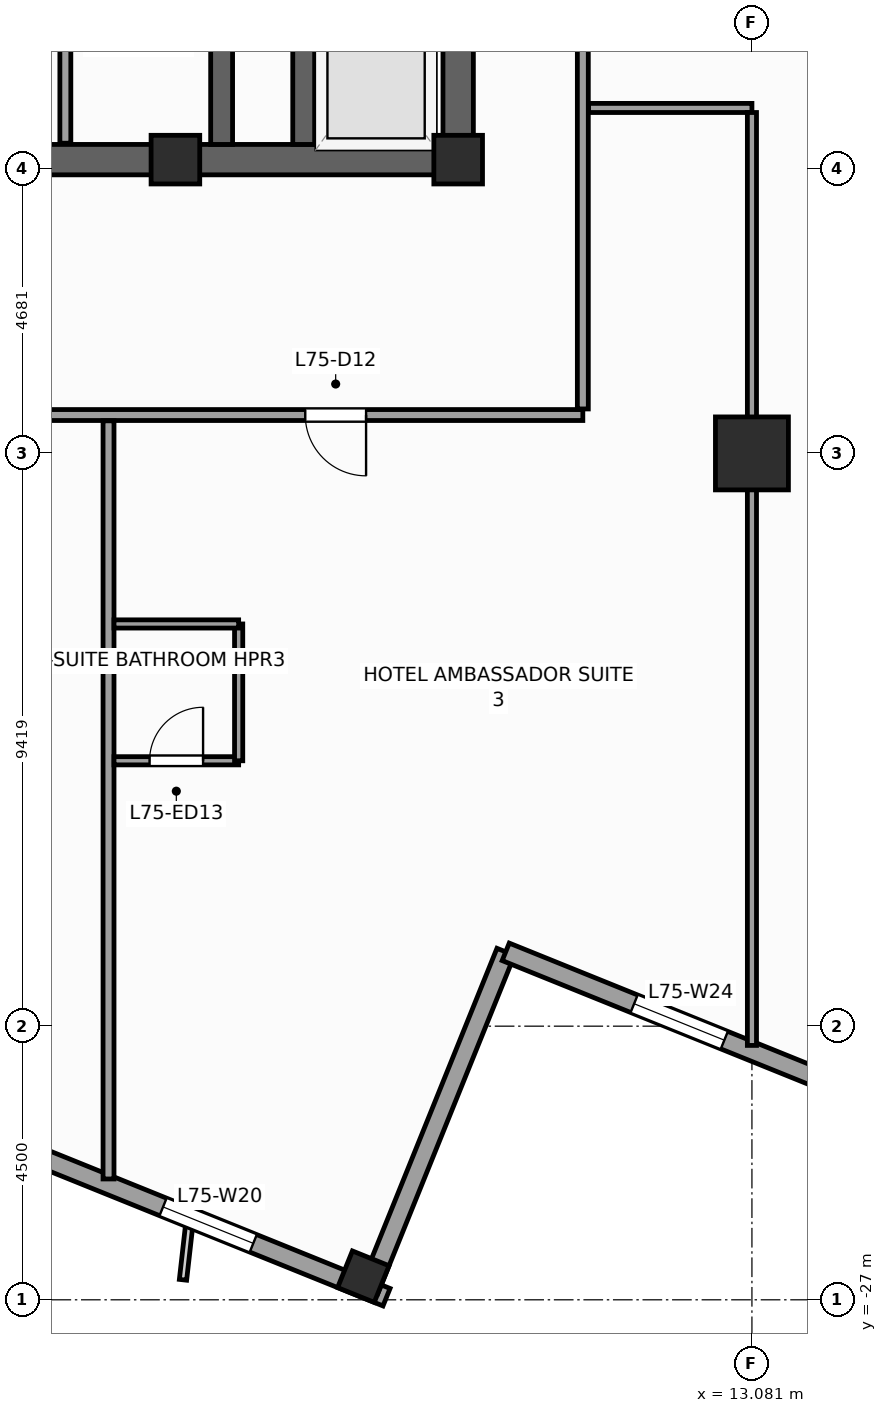
"""IFC4 building model, lengths in metres.
Left out: names, types, materials, properties, quantities, classifications, styles, units other than length and angle.
Written with IfcOpenShell. Run it as: python <this file> out.ifc"""

import sys

from ifc_helpers import new_model, si_unit, direction, frame, frame_2d, origin, origin_2d, place, context, subcontext, project, spatial, rectangle, extrude, source, transform, mapped, element, fill, save


model = new_model("IFC4")
c1 = context("Model", 3, precision=1e-05, world=origin(), true_north=direction((0.0, 1.0)))
c2 = subcontext(c1, "Body", "Model", "MODEL_VIEW")
j1 = project(units=[si_unit("LENGTHUNIT", "METRE"), si_unit("PLANEANGLEUNIT", "RADIAN")], contexts=[c1])
p1 = place(None, origin())
s1 = spatial("IfcSite", under=j1, at=p1, CompositionType="ELEMENT")
p2 = place(p1, origin())
s2 = spatial("IfcBuilding", under=s1, at=p2, CompositionType="ELEMENT")
p3 = place(p2, frame((0.0, 0.0, 304.8)))
s3 = spatial("IfcBuildingStorey", under=s2, at=p3, CompositionType="ELEMENT", Elevation=304.8)
p4 = place(p3, frame((-8.5, -8.25, 0.0), z_axis=(0.0, 0.0, 1.0), x_axis=(1.0, 0.0, 0.0)))
e1 = element("IfcWall", 1, at=p4, inside=s3, PredefinedType="SHEAR", context=c2, shape_type="SweptSolid", body=[
    extrude(rectangle(XDim=17.0, YDim=0.5, at=frame_2d((8.5, 0.0))), origin(), (0.0, 0.0, 1.0), 3.6),
])
p5 = place(p4, frame((7.85, 0.0, 0.0)))
e2 = element("IfcOpeningElement", 2, at=p5, cuts=e1, PredefinedType="OPENING", context=c2, shape_type="SweptSolid", body=[
    extrude(rectangle(XDim=1.3, YDim=2.2, at=frame_2d((0.65, 1.1))), frame((0.0, 0.26, 0.0), z_axis=(0.0, -1.0, 0.0), x_axis=(1.0, 0.0, 0.0)), (0.0, 0.0, 1.0), 0.52),
])
p6 = place(p3, frame((8.25, -8.0, 0.0), z_axis=(0.0, 0.0, 1.0), x_axis=(0.0, 1.0, 0.0)))
e3 = element("IfcWall", 3, at=p6, inside=s3, PredefinedType="SHEAR", context=c2, shape_type="SweptSolid", body=[
    extrude(rectangle(XDim=16.0, YDim=0.5, at=frame_2d((8.0, 0.0))), origin(), (0.0, 0.0, 1.0), 3.6),
])
p7 = place(p6, frame((4.69, 0.0, 0.0)))
e4 = element("IfcOpeningElement", 4, at=p7, cuts=e3, PredefinedType="OPENING", context=c2, shape_type="SweptSolid", body=[
    extrude(rectangle(XDim=1.3, YDim=2.2, at=frame_2d((0.65, 1.1))), frame((0.0, 0.26, 0.0), z_axis=(0.0, -1.0, 0.0), x_axis=(1.0, 0.0, 0.0)), (0.0, 0.0, 1.0), 0.52),
])
p8 = place(p3, frame((4.36, -8.0, 0.0), z_axis=(0.0, 0.0, 1.0), x_axis=(0.0, 1.0, 0.0)))
e5 = element("IfcWall", 5, at=p8, inside=s3, PredefinedType="SHEAR", context=c2, shape_type="SweptSolid", body=[
    extrude(rectangle(XDim=16.0, YDim=0.36, at=frame_2d((8.0, 0.0))), origin(), (0.0, 0.0, 1.0), 3.6),
])
p9 = place(p3, frame((5.71, -8.0, 0.0), z_axis=(0.0, 0.0, 1.0), x_axis=(0.0, 1.0, 0.0)))
e6 = element("IfcWall", 6, at=p9, inside=s3, PredefinedType="SHEAR", context=c2, shape_type="SweptSolid", body=[
    extrude(rectangle(XDim=2.54, YDim=0.36, at=frame_2d((1.27, 0.0))), origin(), (0.0, 0.0, 1.0), 3.6),
])
m1 = source(origin(), c2, "Body", "SweptSolid", [
    extrude(rectangle(XDim=0.8, YDim=0.8, at=origin_2d()), origin(), (0.0, 0.0, 1.0), 3.6),
])
for number, where, z_axis, x_axis in (
    (7, (8.25, -8.25, 0.0), (0.0, 0.0, 1.0), (1.0, 0.0, 0.0)),
    (8, (3.6, -8.25, 0.0), (0.0, 0.0, 1.0), (1.0, 0.0, 0.0)),
):
    element("IfcColumn", number, at=place(p3, frame(where, z_axis=z_axis, x_axis=x_axis)), inside=s3, PredefinedType="PILASTER", context=c2, shape_type="MappedRepresentation", body=[
        mapped(m1, transform((0.0, 0.0, 0.0), scale=1.0)),
    ])
m2 = source(origin(), c2, "Body", "SweptSolid", [
    extrude(rectangle(XDim=1.2, YDim=1.2, at=origin_2d()), origin(), (0.0, 0.0, 1.0), 3.6),
])
p10 = place(p3, frame((13.081, -13.081, 0.0), z_axis=(0.0, 0.0, 1.0), x_axis=(1.0, 0.0, 0.0)))
e9 = element("IfcColumn", 9, at=p10, inside=s3, PredefinedType="COLUMN", context=c2, shape_type="MappedRepresentation", body=[
    mapped(m2, transform((0.0, 0.0, 0.0), scale=1.0)),
])
m3 = source(origin(), c2, "Body", "SweptSolid", [
    extrude(rectangle(XDim=0.65, YDim=0.65, at=origin_2d()), origin(), (0.0, 0.0, 1.0), 3.6),
])
p11 = place(p3, frame((6.69, -26.62, 0.0), z_axis=(0.0, 0.0, 1.0), x_axis=(0.374606593416, 0.927183854567, 0.0)))
e10 = element("IfcColumn", 10, at=p11, inside=s3, PredefinedType="COLUMN", context=c2, shape_type="MappedRepresentation", body=[
    mapped(m3, transform((0.0, 0.0, 0.0), scale=1.0)),
])
p12 = place(p3, frame((-23.813, -14.479, 0.0), z_axis=(0.0, 0.0, 1.0), x_axis=(0.927182657188, -0.374609557019, 0.0)))
e11 = element("IfcWall", 11, at=p12, inside=s3, PredefinedType="STANDARD", context=c2, shape_type="SweptSolid", body=[
    extrude(rectangle(XDim=33.31, YDim=0.31, at=frame_2d((16.655, 0.0))), origin(), (0.0, 0.0, 1.0), 2.75),
])
p13 = place(p12, frame((3.197, 0.0, 0.47)))
e12 = element("IfcOpeningElement", 12, at=p13, cuts=e11, PredefinedType="OPENING", context=c2, shape_type="SweptSolid", body=[
    extrude(rectangle(XDim=1.6, YDim=2.1, at=frame_2d((0.8, 1.05))), frame((0.0, 0.165, 0.0), z_axis=(0.0, -1.0, 0.0), x_axis=(1.0, 0.0, 0.0)), (0.0, 0.0, 1.0), 0.33),
])
p14 = place(p12, frame((8.86, 0.0, 0.47)))
e13 = element("IfcOpeningElement", 13, at=p14, cuts=e11, PredefinedType="OPENING", context=c2, shape_type="SweptSolid", body=[
    extrude(rectangle(XDim=1.6, YDim=2.1, at=frame_2d((0.8, 1.05))), frame((0.0, 0.165, 0.0), z_axis=(0.0, -1.0, 0.0), x_axis=(1.0, 0.0, 0.0)), (0.0, 0.0, 1.0), 0.33),
])
p15 = place(p12, frame((14.439, 0.0, 0.47)))
e14 = element("IfcOpeningElement", 14, at=p15, cuts=e11, PredefinedType="OPENING", context=c2, shape_type="SweptSolid", body=[
    extrude(rectangle(XDim=1.6, YDim=2.1, at=frame_2d((0.8, 1.05))), frame((0.0, 0.165, 0.0), z_axis=(0.0, -1.0, 0.0), x_axis=(1.0, 0.0, 0.0)), (0.0, 0.0, 1.0), 0.33),
])
p16 = place(p12, frame((23.351, 0.0, 0.47)))
e15 = element("IfcOpeningElement", 15, at=p16, cuts=e11, PredefinedType="OPENING", context=c2, shape_type="SweptSolid", body=[
    extrude(rectangle(XDim=1.6, YDim=2.1, at=frame_2d((0.8, 1.05))), frame((0.0, 0.165, 0.0), z_axis=(0.0, -1.0, 0.0), x_axis=(1.0, 0.0, 0.0)), (0.0, 0.0, 1.0), 0.33),
])
p17 = place(p12, frame((29.347, 0.0, 0.47)))
e16 = element("IfcOpeningElement", 16, at=p17, cuts=e11, PredefinedType="OPENING", context=c2, shape_type="SweptSolid", body=[
    extrude(rectangle(XDim=1.6, YDim=2.1, at=frame_2d((0.8, 1.05))), frame((0.0, 0.165, 0.0), z_axis=(0.0, -1.0, 0.0), x_axis=(1.0, 0.0, 0.0)), (0.0, 0.0, 1.0), 0.33),
])
p18 = place(p3, frame((6.784, -26.841, 0.0), z_axis=(0.0, 0.0, 1.0), x_axis=(0.374636620962, 0.927171722085, 0.0)))
e17 = element("IfcWall", 17, at=p18, inside=s3, PredefinedType="STANDARD", context=c2, shape_type="SweptSolid", body=[
    extrude(rectangle(XDim=6.0, YDim=0.31, at=frame_2d((3.0, 0.0))), origin(), (0.0, 0.0, 1.0), 2.65),
])
p19 = place(p3, frame((9.032, -21.278, 0.0), z_axis=(0.0, 0.0, 1.0), x_axis=(0.927185411764, -0.374602739196, 0.0)))
e18 = element("IfcWall", 18, at=p19, inside=s3, PredefinedType="STANDARD", context=c2, shape_type="SweptSolid", body=[
    extrude(rectangle(XDim=6.155, YDim=0.31, at=frame_2d((3.078, 0.0))), origin(), (0.0, 0.0, 1.0), 3.35),
])
p20 = place(p19, frame((2.278, 0.0, 0.47)))
e19 = element("IfcOpeningElement", 19, at=p20, cuts=e18, PredefinedType="OPENING", context=c2, shape_type="SweptSolid", body=[
    extrude(rectangle(XDim=1.6, YDim=2.1, at=frame_2d((0.8, 1.05))), frame((0.0, 0.165, 0.0), z_axis=(0.0, -1.0, 0.0), x_axis=(1.0, 0.0, 0.0)), (0.0, 0.0, 1.0), 0.33),
])
p21 = place(p3, frame((1.79, -7.98, 0.0), z_axis=(0.0, 0.0, 1.0), x_axis=(0.0, 1.0, 0.0)))
e20 = element("IfcWall", 20, at=p21, inside=s3, PredefinedType="PARTITIONING", context=c2, shape_type="SweptSolid", body=[
    extrude(rectangle(XDim=12.38, YDim=0.18, at=frame_2d((6.19, 0.0))), origin(), (0.0, 0.0, 1.0), 3.35),
])
p22 = place(p21, frame((8.8, 0.0, 0.0)))
e21 = element("IfcOpeningElement", 21, at=p22, cuts=e20, PredefinedType="OPENING", context=c2, shape_type="SweptSolid", body=[
    extrude(rectangle(XDim=1.1, YDim=2.2, at=frame_2d((0.55, 1.1))), frame((0.0, 0.1, 0.0), z_axis=(0.0, -1.0, 0.0), x_axis=(1.0, 0.0, 0.0)), (0.0, 0.0, 1.0), 0.2),
])
p23 = place(p21, frame((10.86, 0.0, 0.0)))
e22 = element("IfcOpeningElement", 22, at=p23, cuts=e20, PredefinedType="OPENING", context=c2, shape_type="SweptSolid", body=[
    extrude(rectangle(XDim=1.1, YDim=2.2, at=frame_2d((0.55, 1.1))), frame((0.0, 0.1, 0.0), z_axis=(0.0, -1.0, 0.0), x_axis=(1.0, 0.0, 0.0)), (0.0, 0.0, 1.0), 0.2),
])
p24 = place(p21, frame((3.5, 0.0, 0.0)))
e23 = element("IfcOpeningElement", 23, at=p24, cuts=e20, PredefinedType="OPENING", context=c2, shape_type="SweptSolid", body=[
    extrude(rectangle(XDim=1.15, YDim=2.25, at=frame_2d((0.575, 1.125))), frame((0.0, 0.1, 0.0), z_axis=(0.0, -1.0, 0.0), x_axis=(1.0, 0.0, 0.0)), (0.0, 0.0, 1.0), 0.2),
])
p25 = place(p3, frame((-10.3, -12.45, 0.0), z_axis=(0.0, 0.0, 1.0), x_axis=(1.0, 0.0, 0.0)))
e24 = element("IfcWall", 24, at=p25, inside=s3, PredefinedType="PARTITIONING", context=c2, shape_type="SweptSolid", body=[
    extrude(rectangle(XDim=20.6, YDim=0.18, at=frame_2d((10.3, 0.0))), origin(), (0.0, 0.0, 1.0), 3.35),
])
p26 = place(p25, frame((1.605, 0.0, 0.0)))
e25 = element("IfcOpeningElement", 25, at=p26, cuts=e24, PredefinedType="OPENING", context=c2, shape_type="SweptSolid", body=[
    extrude(rectangle(XDim=0.95, YDim=2.1, at=frame_2d((0.475, 1.05))), frame((0.0, 0.1, 0.0), z_axis=(0.0, -1.0, 0.0), x_axis=(1.0, 0.0, 0.0)), (0.0, 0.0, 1.0), 0.2),
])
p27 = place(p25, frame((16.036, 0.0, 0.0)))
e26 = element("IfcOpeningElement", 26, at=p27, cuts=e24, PredefinedType="OPENING", context=c2, shape_type="SweptSolid", body=[
    extrude(rectangle(XDim=1.0, YDim=2.15, at=frame_2d((0.5, 1.075))), frame((0.0, 0.1, 0.0), z_axis=(0.0, -1.0, 0.0), x_axis=(1.0, 0.0, 0.0)), (0.0, 0.0, 1.0), 0.2),
])
p28 = place(p25, frame((9.55, 0.0, 0.0)))
e27 = element("IfcOpeningElement", 27, at=p28, cuts=e24, PredefinedType="OPENING", context=c2, shape_type="SweptSolid", body=[
    extrude(rectangle(XDim=1.0, YDim=2.15, at=frame_2d((0.5, 1.075))), frame((0.0, 0.1, 0.0), z_axis=(0.0, -1.0, 0.0), x_axis=(1.0, 0.0, 0.0)), (0.0, 0.0, 1.0), 0.2),
])
p29 = place(p3, frame((10.3, -12.35, 0.0), z_axis=(0.0, 0.0, 1.0), x_axis=(0.0, 1.0, 0.0)))
e28 = element("IfcWall", 28, at=p29, inside=s3, PredefinedType="PARTITIONING", context=c2, shape_type="SweptSolid", body=[
    extrude(rectangle(XDim=24.7, YDim=0.18, at=frame_2d((12.35, 0.0))), origin(), (0.0, 0.0, 1.0), 3.35),
])
p30 = place(p29, frame((21.561, 0.0, 0.0)))
e29 = element("IfcOpeningElement", 29, at=p30, cuts=e28, PredefinedType="OPENING", context=c2, shape_type="SweptSolid", body=[
    extrude(rectangle(XDim=1.0, YDim=2.15, at=frame_2d((0.5, 1.075))), frame((0.0, 0.1, 0.0), z_axis=(0.0, -1.0, 0.0), x_axis=(1.0, 0.0, 0.0)), (0.0, 0.0, 1.0), 0.2),
])
p31 = place(p29, frame((16.8, 0.0, 0.0)))
e30 = element("IfcOpeningElement", 30, at=p31, cuts=e28, PredefinedType="OPENING", context=c2, shape_type="SweptSolid", body=[
    extrude(rectangle(XDim=1.0, YDim=2.15, at=frame_2d((0.5, 1.075))), frame((0.0, 0.1, 0.0), z_axis=(0.0, -1.0, 0.0), x_axis=(1.0, 0.0, 0.0)), (0.0, 0.0, 1.0), 0.2),
])
p32 = place(p29, frame((11.85, 0.0, 0.0)))
e31 = element("IfcOpeningElement", 31, at=p32, cuts=e28, PredefinedType="OPENING", context=c2, shape_type="SweptSolid", body=[
    extrude(rectangle(XDim=1.0, YDim=2.15, at=frame_2d((0.5, 1.075))), frame((0.0, 0.1, 0.0), z_axis=(0.0, -1.0, 0.0), x_axis=(1.0, 0.0, 0.0)), (0.0, 0.0, 1.0), 0.2),
])
p33 = place(p29, frame((6.9, 0.0, 0.0)))
e32 = element("IfcOpeningElement", 32, at=p33, cuts=e28, PredefinedType="OPENING", context=c2, shape_type="SweptSolid", body=[
    extrude(rectangle(XDim=1.0, YDim=2.15, at=frame_2d((0.5, 1.075))), frame((0.0, 0.1, 0.0), z_axis=(0.0, -1.0, 0.0), x_axis=(1.0, 0.0, 0.0)), (0.0, 0.0, 1.0), 0.2),
])
p34 = place(p3, frame((2.5, -12.545, 0.0), z_axis=(0.0, 0.0, 1.0), x_axis=(0.0, -1.0, 0.0)))
e33 = element("IfcWall", 33, at=p34, inside=s3, PredefinedType="PARTITIONING", context=c2, shape_type="SweptSolid", body=[
    extrude(rectangle(XDim=12.468, YDim=0.18, at=frame_2d((6.234, 0.0))), origin(), (0.0, 0.0, 1.0), 3.02),
])
p35 = place(p3, frame((10.395, -7.4, 0.0), z_axis=(0.0, 0.0, 1.0), x_axis=(1.0, 0.0, 0.0)))
e34 = element("IfcWall", 34, at=p35, inside=s3, PredefinedType="PARTITIONING", context=c2, shape_type="SweptSolid", body=[
    extrude(rectangle(XDim=2.686, YDim=0.15, at=frame_2d((1.343, 0.0))), origin(), (0.0, 0.0, 1.0), 3.35),
])
p36 = place(p3, frame((13.081, -7.475, 0.0), z_axis=(0.0, 0.0, 1.0), x_axis=(0.0, -1.0, 0.0)))
e35 = element("IfcWall", 35, at=p36, inside=s3, PredefinedType="PARTITIONING", context=c2, shape_type="SweptSolid", body=[
    extrude(rectangle(XDim=15.342, YDim=0.15, at=frame_2d((7.671, 0.0))), origin(), (0.0, 0.0, 1.0), 2.45),
])
p37 = place(p3, frame((2.59, -18.136, 0.0), z_axis=(0.0, 0.0, 1.0), x_axis=(1.0, 0.0, 0.0)))
e36 = element("IfcWall", 36, at=p37, inside=s3, PredefinedType="PARTITIONING", context=c2, shape_type="SweptSolid", body=[
    extrude(rectangle(XDim=2.05, YDim=0.135, at=frame_2d((1.025, 0.0))), origin(), (0.0, 0.0, 1.0), 3.35),
])
p38 = place(p37, frame((0.585, 0.0, 0.0)))
e37 = element("IfcOpeningElement", 37, at=p38, cuts=e36, PredefinedType="OPENING", context=c2, shape_type="SweptSolid", body=[
    extrude(rectangle(XDim=0.88, YDim=2.1, at=frame_2d((0.44, 1.05))), frame((0.0, 0.078, 0.0), z_axis=(0.0, -1.0, 0.0), x_axis=(1.0, 0.0, 0.0)), (0.0, 0.0, 1.0), 0.155),
])
p39 = place(p3, frame((4.64, -18.136, 0.0), z_axis=(0.0, 0.0, 1.0), x_axis=(0.0, 1.0, 0.0)))
e38 = element("IfcWall", 38, at=p39, inside=s3, PredefinedType="PARTITIONING", context=c2, shape_type="SweptSolid", body=[
    extrude(rectangle(XDim=2.25, YDim=0.135, at=frame_2d((1.125, 0.0))), origin(), (0.0, 0.0, 1.0), 3.35),
])
p40 = place(p3, frame((2.59, -15.886, 0.0), z_axis=(0.0, 0.0, 1.0), x_axis=(1.0, 0.0, 0.0)))
e39 = element("IfcWall", 39, at=p40, inside=s3, PredefinedType="PARTITIONING", context=c2, shape_type="SweptSolid", body=[
    extrude(rectangle(XDim=2.05, YDim=0.135, at=frame_2d((1.025, 0.0))), origin(), (0.0, 0.0, 1.0), 3.35),
])
m4 = source(origin(), c2, "Body", "SweptSolid", [
    extrude(rectangle(XDim=1.6, YDim=2.1, at=frame_2d((0.8, 1.05))), frame((0.0, 0.03, 0.0), z_axis=(0.0, -1.0, 0.0), x_axis=(1.0, 0.0, 0.0)), (0.0, 0.0, 1.0), 0.06),
])
p41 = place(p17, origin())
e40 = element("IfcWindow", 40, at=p41, inside=s3, PartitioningType="SINGLE_PANEL", PredefinedType="WINDOW", context=c2, shape_type="MappedRepresentation", body=[
    mapped(m4, transform((0.0, 0.0, 0.0), scale=1.0)),
])
fill(e16, e40)
p42 = place(p20, origin())
e41 = element("IfcWindow", 41, at=p42, inside=s3, PartitioningType="SINGLE_PANEL", PredefinedType="WINDOW", context=c2, shape_type="MappedRepresentation", body=[
    mapped(m4, transform((0.0, 0.0, 0.0), scale=1.0)),
])
fill(e19, e41)
m5 = source(origin(), c2, "Body", "SweptSolid", [
    extrude(rectangle(XDim=1.0, YDim=2.15, at=frame_2d((0.5, 1.075))), frame((0.0, 0.025, 0.0), z_axis=(0.0, -1.0, 0.0), x_axis=(1.0, 0.0, 0.0)), (0.0, 0.0, 1.0), 0.05),
])
p43 = place(p27, frame((1.0, 0.0, 0.0), z_axis=(0.0, 0.0, 1.0), x_axis=(-1.0, 0.0, 0.0)))
e42 = element("IfcDoor", 42, at=p43, inside=s3, OperationType="SINGLE_SWING_RIGHT", PredefinedType="DOOR", context=c2, shape_type="MappedRepresentation", body=[
    mapped(m5, transform((0.0, 0.0, 0.0), scale=1.0)),
])
fill(e26, e42)
m6 = source(origin(), c2, "Body", "SweptSolid", [
    extrude(rectangle(XDim=0.88, YDim=2.1, at=frame_2d((0.44, 1.05))), frame((0.0, 0.025, 0.0), z_axis=(0.0, -1.0, 0.0), x_axis=(1.0, 0.0, 0.0)), (0.0, 0.0, 1.0), 0.05),
])
p44 = place(p38, origin())
e43 = element("IfcDoor", 43, at=p44, inside=s3, OperationType="SINGLE_SWING_RIGHT", PredefinedType="DOOR", context=c2, shape_type="MappedRepresentation", body=[
    mapped(m6, transform((0.0, 0.0, 0.0), scale=1.0)),
])
fill(e37, e43)
save(model, sys.argv[1])
